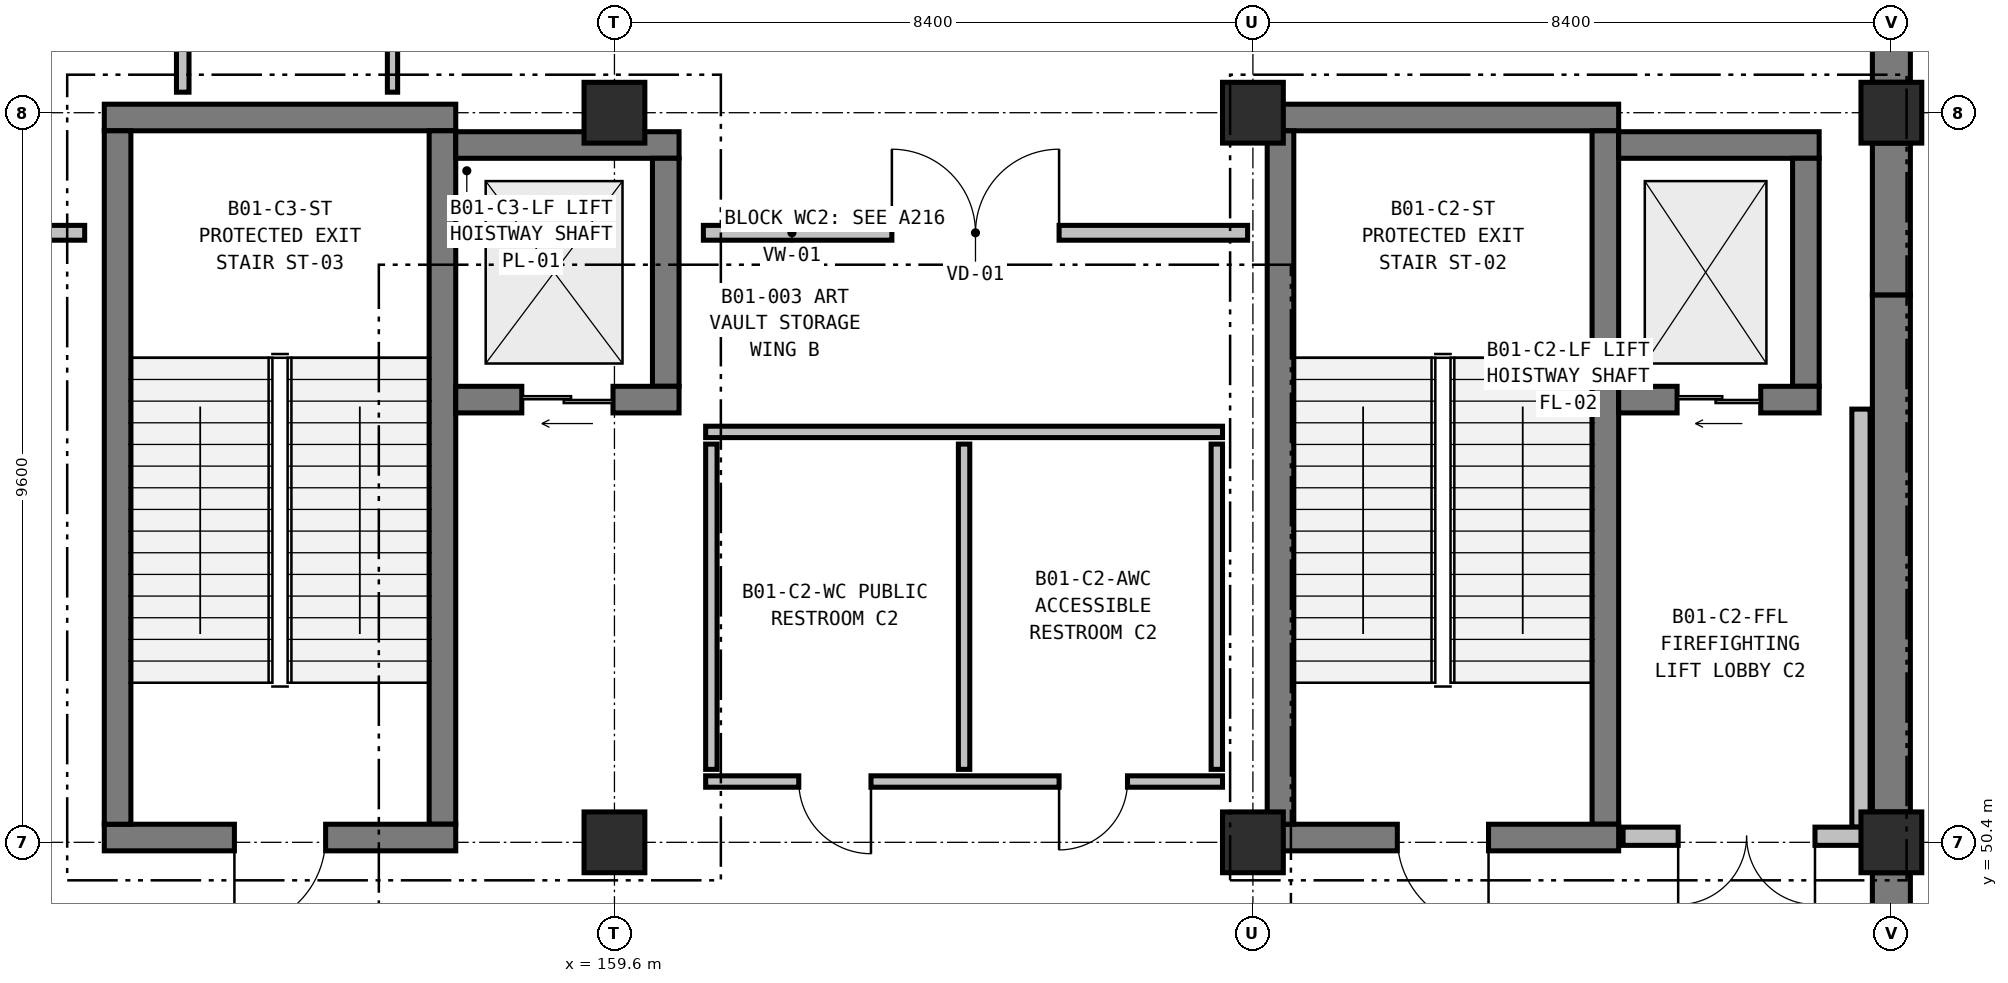
"""IFC4 building model, lengths in metres.
Left out: names, types, materials, properties, quantities, classifications, styles, units other than length and angle.
Written with IfcOpenShell. Run it as: python <this file> out.ifc"""

import sys

from ifc_helpers import new_model, si_unit, direction, frame, frame_2d, origin, origin_2d, place, context, subcontext, project, spatial, rectangle, extrude, element, fill, save


model = new_model("IFC4")
c1 = context("Model", 3, precision=1e-05, world=origin(), true_north=direction((0.0, 1.0)))
c2 = subcontext(c1, "Body", "Model", "MODEL_VIEW")
j1 = project(units=[si_unit("LENGTHUNIT", "METRE"), si_unit("PLANEANGLEUNIT", "RADIAN")], contexts=[c1])
p1 = place(None, origin())
s1 = spatial("IfcSite", under=j1, at=p1, CompositionType="ELEMENT")
p2 = place(p1, origin())
s2 = spatial("IfcBuilding", under=s1, at=p2, CompositionType="ELEMENT")
p3 = place(p2, frame((0.0, 0.0, -5.4)))
s3 = spatial("IfcBuildingStorey", under=s2, at=p3, CompositionType="ELEMENT", Elevation=-5.4)
for number, where, z_axis, x_axis in (
    (1, (159.6, 50.4, 0.0), (0.0, 0.0, 1.0), (1.0, 0.0, 0.0)),
    (2, (159.6, 60.0, 0.0), (0.0, 0.0, 1.0), (1.0, 0.0, 0.0)),
    (3, (168.0, 50.4, 0.0), (0.0, 0.0, 1.0), (1.0, 0.0, 0.0)),
    (4, (168.0, 60.0, 0.0), (0.0, 0.0, 1.0), (1.0, 0.0, 0.0)),
    (5, (176.4, 50.4, 0.0), (0.0, 0.0, 1.0), (1.0, 0.0, 0.0)),
    (6, (176.4, 60.0, 0.0), (0.0, 0.0, 1.0), (1.0, 0.0, 0.0)),
):
    element("IfcColumn", number, at=place(p3, frame(where, z_axis=z_axis, x_axis=x_axis)), inside=s3, PredefinedType="COLUMN", context=c2, shape_type="SweptSolid", body=[
        extrude(rectangle(XDim=0.8, YDim=0.8, at=origin_2d()), origin(), (0.0, 0.0, 1.0), 5.4),
    ])
p4 = place(p3, frame((176.4, 69.2, 0.0), z_axis=(0.0, 0.0, 1.0), x_axis=(0.0, -1.0, 0.0)))
e7 = element("IfcWall", 7, at=p4, inside=s3, PredefinedType="USERDEFINED", context=c2, shape_type="SweptSolid", body=[
    extrude(rectangle(XDim=8.8, YDim=0.5, at=frame_2d((4.4, 0.0))), origin(), (0.0, 0.0, 1.0), 5.06),
])
p5 = place(p3, frame((176.4, 59.6, 0.0), z_axis=(0.0, 0.0, 1.0), x_axis=(0.0, -1.0, 0.0)))
e8 = element("IfcWall", 8, at=p5, inside=s3, PredefinedType="USERDEFINED", context=c2, shape_type="SweptSolid", body=[
    extrude(rectangle(XDim=2.0, YDim=0.5, at=frame_2d((1.0, 0.0))), origin(), (0.0, 0.0, 1.0), 5.06),
])
p6 = place(p3, frame((176.4, 57.6, 0.0), z_axis=(0.0, 0.0, 1.0), x_axis=(0.0, -1.0, 0.0)))
e9 = element("IfcWall", 9, at=p6, inside=s3, PredefinedType="USERDEFINED", context=c2, shape_type="SweptSolid", body=[
    extrude(rectangle(XDim=6.8, YDim=0.5, at=frame_2d((3.4, 0.0))), origin(), (0.0, 0.0, 1.0), 5.06),
])
p7 = place(p3, frame((176.4, 50.0, 0.0), z_axis=(0.0, 0.0, 1.0), x_axis=(0.0, -1.0, 0.0)))
e10 = element("IfcWall", 10, at=p7, inside=s3, PredefinedType="USERDEFINED", context=c2, shape_type="SweptSolid", body=[
    extrude(rectangle(XDim=4.0, YDim=0.5, at=frame_2d((2.0, 0.0))), origin(), (0.0, 0.0, 1.0), 5.06),
])
p8 = place(p3, frame((168.188, 59.937, 0.0), z_axis=(0.0, 0.0, 1.0), x_axis=(1.0, 0.0, 0.0)))
e11 = element("IfcWall", 11, at=p8, inside=s3, PredefinedType="SHEAR", context=c2, shape_type="SweptSolid", body=[
    extrude(rectangle(XDim=4.624, YDim=0.35, at=frame_2d((2.312, 0.0))), origin(), (0.0, 0.0, 1.0), 5.06),
])
p9 = place(p3, frame((172.637, 59.762, 0.0), z_axis=(0.0, 0.0, 1.0), x_axis=(0.0, -1.0, 0.0)))
e12 = element("IfcWall", 12, at=p9, inside=s3, PredefinedType="SHEAR", context=c2, shape_type="SweptSolid", body=[
    extrude(rectangle(XDim=9.124, YDim=0.35, at=frame_2d((4.562, 0.0))), origin(), (0.0, 0.0, 1.0), 5.06),
])
p10 = place(p3, frame((172.812, 50.463, 0.0), z_axis=(0.0, 0.0, 1.0), x_axis=(-1.0, 0.0, 0.0)))
e13 = element("IfcWall", 13, at=p10, inside=s3, PredefinedType="SHEAR", context=c2, shape_type="SweptSolid", body=[
    extrude(rectangle(XDim=4.624, YDim=0.35, at=frame_2d((2.312, 0.0))), origin(), (0.0, 0.0, 1.0), 5.06),
])
p11 = place(p10, frame((1.712, 0.0, 0.0)))
e14 = element("IfcOpeningElement", 14, at=p11, cuts=e13, PredefinedType="OPENING", context=c2, shape_type="SweptSolid", body=[
    extrude(rectangle(XDim=1.2, YDim=2.2, at=frame_2d((0.6, 1.1))), frame((0.0, 0.185, 0.0), z_axis=(0.0, -1.0, 0.0), x_axis=(1.0, 0.0, 0.0)), (0.0, 0.0, 1.0), 0.37),
])
p12 = place(p3, frame((168.363, 50.638, 0.0), z_axis=(0.0, 0.0, 1.0), x_axis=(0.0, 1.0, 0.0)))
e15 = element("IfcWall", 15, at=p12, inside=s3, PredefinedType="SHEAR", context=c2, shape_type="SweptSolid", body=[
    extrude(rectangle(XDim=9.124, YDim=0.35, at=frame_2d((4.562, 0.0))), origin(), (0.0, 0.0, 1.0), 5.06),
])
p13 = place(p3, frame((172.812, 59.575, 0.0), z_axis=(0.0, 0.0, 1.0), x_axis=(1.0, 0.0, 0.0)))
e16 = element("IfcWall", 16, at=p13, inside=s3, PredefinedType="SHEAR", context=c2, shape_type="SweptSolid", body=[
    extrude(rectangle(XDim=2.638, YDim=0.35, at=frame_2d((1.319, 0.0))), origin(), (0.0, 0.0, 1.0), 5.06),
])
p14 = place(p3, frame((175.275, 59.4, 0.0), z_axis=(0.0, 0.0, 1.0), x_axis=(0.0, -1.0, 0.0)))
e17 = element("IfcWall", 17, at=p14, inside=s3, PredefinedType="SHEAR", context=c2, shape_type="SweptSolid", body=[
    extrude(rectangle(XDim=3.0, YDim=0.35, at=frame_2d((1.5, 0.0))), origin(), (0.0, 0.0, 1.0), 5.06),
])
p15 = place(p3, frame((175.45, 56.225, 0.0), z_axis=(0.0, 0.0, 1.0), x_axis=(-1.0, 0.0, 0.0)))
e18 = element("IfcWall", 18, at=p15, inside=s3, PredefinedType="SHEAR", context=c2, shape_type="SweptSolid", body=[
    extrude(rectangle(XDim=2.638, YDim=0.35, at=frame_2d((1.319, 0.0))), origin(), (0.0, 0.0, 1.0), 5.06),
])
p16 = place(p15, frame((0.769, 0.0, 0.0)))
e19 = element("IfcOpeningElement", 19, at=p16, cuts=e18, PredefinedType="OPENING", context=c2, shape_type="SweptSolid", body=[
    extrude(rectangle(XDim=1.1, YDim=2.2, at=frame_2d((0.55, 1.1))), frame((0.0, 0.185, 0.0), z_axis=(0.0, -1.0, 0.0), x_axis=(1.0, 0.0, 0.0)), (0.0, 0.0, 1.0), 0.37),
])
p17 = place(p3, frame((176.0, 56.1, 0.0), z_axis=(0.0, 0.0, 1.0), x_axis=(0.0, -1.0, 0.0)))
e20 = element("IfcWall", 20, at=p17, inside=s3, PredefinedType="PARTITIONING", context=c2, shape_type="SweptSolid", body=[
    extrude(rectangle(XDim=5.5, YDim=0.24, at=frame_2d((2.75, 0.0))), origin(), (0.0, 0.0, 1.0), 4.385),
])
p18 = place(p3, frame((176.12, 50.48, 0.0), z_axis=(0.0, 0.0, 1.0), x_axis=(-1.0, 0.0, 0.0)))
e21 = element("IfcWall", 21, at=p18, inside=s3, PredefinedType="PARTITIONING", context=c2, shape_type="SweptSolid", body=[
    extrude(rectangle(XDim=3.25, YDim=0.24, at=frame_2d((1.625, 0.0))), origin(), (0.0, 0.0, 1.0), 4.385),
])
p19 = place(p18, frame((0.725, 0.0, 0.0)))
e22 = element("IfcOpeningElement", 22, at=p19, cuts=e21, PredefinedType="OPENING", context=c2, shape_type="SweptSolid", body=[
    extrude(rectangle(XDim=1.8, YDim=2.25, at=frame_2d((0.9, 1.125))), frame((0.0, 0.13, 0.0), z_axis=(0.0, -1.0, 0.0), x_axis=(1.0, 0.0, 0.0)), (0.0, 0.0, 1.0), 0.26),
])
p20 = place(p3, frame((167.6, 51.2, 0.0), z_axis=(0.0, 0.0, 1.0), x_axis=(-1.0, 0.0, 0.0)))
e23 = element("IfcWall", 23, at=p20, inside=s3, PredefinedType="PARTITIONING", context=c2, shape_type="SweptSolid", body=[
    extrude(rectangle(XDim=6.8, YDim=0.15, at=frame_2d((3.4, 0.0))), origin(), (0.0, 0.0, 1.0), 5.06),
])
p21 = place(p20, frame((1.25, 0.0, 0.0)))
e24 = element("IfcOpeningElement", 24, at=p21, cuts=e23, PredefinedType="OPENING", context=c2, shape_type="SweptSolid", body=[
    extrude(rectangle(XDim=0.9, YDim=2.1, at=frame_2d((0.45, 1.05))), frame((0.0, 0.085, 0.0), z_axis=(0.0, -1.0, 0.0), x_axis=(1.0, 0.0, 0.0)), (0.0, 0.0, 1.0), 0.17),
])
p22 = place(p20, frame((4.625, 0.0, 0.0)))
e25 = element("IfcOpeningElement", 25, at=p22, cuts=e23, PredefinedType="OPENING", context=c2, shape_type="SweptSolid", body=[
    extrude(rectangle(XDim=0.95, YDim=2.15, at=frame_2d((0.475, 1.075))), frame((0.0, 0.085, 0.0), z_axis=(0.0, -1.0, 0.0), x_axis=(1.0, 0.0, 0.0)), (0.0, 0.0, 1.0), 0.17),
])
p23 = place(p3, frame((160.8, 55.8, 0.0), z_axis=(0.0, 0.0, 1.0), x_axis=(1.0, 0.0, 0.0)))
e26 = element("IfcWall", 26, at=p23, inside=s3, PredefinedType="PARTITIONING", context=c2, shape_type="SweptSolid", body=[
    extrude(rectangle(XDim=6.8, YDim=0.15, at=frame_2d((3.4, 0.0))), origin(), (0.0, 0.0, 1.0), 5.06),
])
for number, where, z_axis, x_axis in (
    (27, (160.875, 51.36, 0.0), (0.0, 0.0, 1.0), (0.0, 1.0, 0.0)),
    (28, (164.2, 51.36, 0.0), (0.0, 0.0, 1.0), (0.0, 1.0, 0.0)),
    (29, (167.525, 51.36, 0.0), (0.0, 0.0, 1.0), (0.0, 1.0, 0.0)),
):
    element("IfcWall", number, at=place(p3, frame(where, z_axis=z_axis, x_axis=x_axis)), inside=s3, PredefinedType="PARTITIONING", context=c2, shape_type="SweptSolid", body=[
        extrude(rectangle(XDim=4.28, YDim=0.15, at=frame_2d((2.14, 0.0))), origin(), (0.0, 0.0, 1.0), 5.06),
    ])
p24 = place(p3, frame((152.888, 59.937, 0.0), z_axis=(0.0, 0.0, 1.0), x_axis=(1.0, 0.0, 0.0)))
e30 = element("IfcWall", 30, at=p24, inside=s3, PredefinedType="SHEAR", context=c2, shape_type="SweptSolid", body=[
    extrude(rectangle(XDim=4.624, YDim=0.35, at=frame_2d((2.312, 0.0))), origin(), (0.0, 0.0, 1.0), 5.06),
])
p25 = place(p3, frame((157.337, 59.762, 0.0), z_axis=(0.0, 0.0, 1.0), x_axis=(0.0, -1.0, 0.0)))
e31 = element("IfcWall", 31, at=p25, inside=s3, PredefinedType="SHEAR", context=c2, shape_type="SweptSolid", body=[
    extrude(rectangle(XDim=9.124, YDim=0.35, at=frame_2d((4.562, 0.0))), origin(), (0.0, 0.0, 1.0), 5.06),
])
p26 = place(p3, frame((157.512, 50.463, 0.0), z_axis=(0.0, 0.0, 1.0), x_axis=(-1.0, 0.0, 0.0)))
e32 = element("IfcWall", 32, at=p26, inside=s3, PredefinedType="SHEAR", context=c2, shape_type="SweptSolid", body=[
    extrude(rectangle(XDim=4.624, YDim=0.35, at=frame_2d((2.312, 0.0))), origin(), (0.0, 0.0, 1.0), 5.06),
])
p27 = place(p26, frame((1.712, 0.0, 0.0)))
e33 = element("IfcOpeningElement", 33, at=p27, cuts=e32, PredefinedType="OPENING", context=c2, shape_type="SweptSolid", body=[
    extrude(rectangle(XDim=1.2, YDim=2.2, at=frame_2d((0.6, 1.1))), frame((0.0, 0.185, 0.0), z_axis=(0.0, -1.0, 0.0), x_axis=(1.0, 0.0, 0.0)), (0.0, 0.0, 1.0), 0.37),
])
p28 = place(p3, frame((153.063, 50.638, 0.0), z_axis=(0.0, 0.0, 1.0), x_axis=(0.0, 1.0, 0.0)))
e34 = element("IfcWall", 34, at=p28, inside=s3, PredefinedType="SHEAR", context=c2, shape_type="SweptSolid", body=[
    extrude(rectangle(XDim=9.124, YDim=0.35, at=frame_2d((4.562, 0.0))), origin(), (0.0, 0.0, 1.0), 5.06),
])
p29 = place(p3, frame((157.512, 59.575, 0.0), z_axis=(0.0, 0.0, 1.0), x_axis=(1.0, 0.0, 0.0)))
e35 = element("IfcWall", 35, at=p29, inside=s3, PredefinedType="SHEAR", context=c2, shape_type="SweptSolid", body=[
    extrude(rectangle(XDim=2.938, YDim=0.35, at=frame_2d((1.469, 0.0))), origin(), (0.0, 0.0, 1.0), 5.06),
])
p30 = place(p3, frame((160.275, 59.4, 0.0), z_axis=(0.0, 0.0, 1.0), x_axis=(0.0, -1.0, 0.0)))
e36 = element("IfcWall", 36, at=p30, inside=s3, PredefinedType="SHEAR", context=c2, shape_type="SweptSolid", body=[
    extrude(rectangle(XDim=3.0, YDim=0.35, at=frame_2d((1.5, 0.0))), origin(), (0.0, 0.0, 1.0), 5.06),
])
p31 = place(p3, frame((160.45, 56.225, 0.0), z_axis=(0.0, 0.0, 1.0), x_axis=(-1.0, 0.0, 0.0)))
e37 = element("IfcWall", 37, at=p31, inside=s3, PredefinedType="SHEAR", context=c2, shape_type="SweptSolid", body=[
    extrude(rectangle(XDim=2.938, YDim=0.35, at=frame_2d((1.469, 0.0))), origin(), (0.0, 0.0, 1.0), 5.06),
])
p32 = place(p31, frame((0.869, 0.0, 0.0)))
e38 = element("IfcOpeningElement", 38, at=p32, cuts=e37, PredefinedType="OPENING", context=c2, shape_type="SweptSolid", body=[
    extrude(rectangle(XDim=1.2, YDim=2.2, at=frame_2d((0.6, 1.1))), frame((0.0, 0.185, 0.0), z_axis=(0.0, -1.0, 0.0), x_axis=(1.0, 0.0, 0.0)), (0.0, 0.0, 1.0), 0.37),
])
p33 = place(p3, frame((134.8, 58.42, 0.0), z_axis=(0.0, 0.0, 1.0), x_axis=(1.0, 0.0, 0.0)))
e39 = element("IfcWall", 39, at=p33, inside=s3, PredefinedType="PARTITIONING", context=c2, shape_type="SweptSolid", body=[
    extrude(rectangle(XDim=17.83, YDim=0.195, at=frame_2d((8.915, 0.0))), origin(), (0.0, 0.0, 1.0), 4.235),
])
p34 = place(p33, frame((9.315, 0.0, 0.0)))
e40 = element("IfcOpeningElement", 40, at=p34, cuts=e39, PredefinedType="OPENING", context=c2, shape_type="SweptSolid", body=[
    extrude(rectangle(XDim=2.2, YDim=2.6, at=frame_2d((1.1, 1.3))), frame((0.0, 0.107, 0.0), z_axis=(0.0, -1.0, 0.0), x_axis=(1.0, 0.0, 0.0)), (0.0, 0.0, 1.0), 0.215),
])
p35 = place(p3, frame((160.77, 58.42, 0.0), z_axis=(0.0, 0.0, 1.0), x_axis=(1.0, 0.0, 0.0)))
e41 = element("IfcWall", 41, at=p35, inside=s3, PredefinedType="PARTITIONING", context=c2, shape_type="SweptSolid", body=[
    extrude(rectangle(XDim=7.16, YDim=0.195, at=frame_2d((3.58, 0.0))), origin(), (0.0, 0.0, 1.0), 4.235),
])
p36 = place(p35, frame((2.48, 0.0, 0.0)))
e42 = element("IfcOpeningElement", 42, at=p36, cuts=e41, PredefinedType="OPENING", context=c2, shape_type="SweptSolid", body=[
    extrude(rectangle(XDim=2.2, YDim=2.6, at=frame_2d((1.1, 1.3))), frame((0.0, 0.107, 0.0), z_axis=(0.0, -1.0, 0.0), x_axis=(1.0, 0.0, 0.0)), (0.0, 0.0, 1.0), 0.215),
])
p37 = place(p3, frame((153.92, 71.17, 0.0), z_axis=(0.0, 0.0, 1.0), x_axis=(0.0, -1.0, 0.0)))
e43 = element("IfcWall", 43, at=p37, inside=s3, PredefinedType="PARTITIONING", context=c2, shape_type="SweptSolid", body=[
    extrude(rectangle(XDim=10.9, YDim=0.165, at=frame_2d((5.45, 0.0))), origin(), (0.0, 0.0, 1.0), 4.185),
])
p38 = place(p37, frame((4.55, 0.0, 0.0)))
e44 = element("IfcOpeningElement", 44, at=p38, cuts=e43, PredefinedType="OPENING", context=c2, shape_type="SweptSolid", body=[
    extrude(rectangle(XDim=1.8, YDim=2.4, at=frame_2d((0.9, 1.2))), frame((0.0, 0.093, 0.0), z_axis=(0.0, -1.0, 0.0), x_axis=(1.0, 0.0, 0.0)), (0.0, 0.0, 1.0), 0.185),
])
p39 = place(p3, frame((156.68, 60.27, 0.0), z_axis=(0.0, 0.0, 1.0), x_axis=(0.0, 1.0, 0.0)))
e45 = element("IfcWall", 45, at=p39, inside=s3, PredefinedType="PARTITIONING", context=c2, shape_type="SweptSolid", body=[
    extrude(rectangle(XDim=10.9, YDim=0.135, at=frame_2d((5.45, 0.0))), origin(), (0.0, 0.0, 1.0), 4.185),
])
p40 = place(p39, frame((4.65, 0.0, 0.0)))
e46 = element("IfcOpeningElement", 46, at=p40, cuts=e45, PredefinedType="OPENING", context=c2, shape_type="SweptSolid", body=[
    extrude(rectangle(XDim=1.6, YDim=2.35, at=frame_2d((0.8, 1.175))), frame((0.0, 0.077, 0.0), z_axis=(0.0, -1.0, 0.0), x_axis=(1.0, 0.0, 0.0)), (0.0, 0.0, 1.0), 0.155),
])
p41 = place(p11, origin())
e47 = element("IfcDoor", 47, at=p41, inside=s3, OperationType="SINGLE_SWING_LEFT", PredefinedType="DOOR", context=c2, shape_type="SweptSolid", body=[
    extrude(rectangle(XDim=1.2, YDim=2.2, at=frame_2d((0.6, 1.1))), frame((0.0, 0.025, 0.0), z_axis=(0.0, -1.0, 0.0), x_axis=(1.0, 0.0, 0.0)), (0.0, 0.0, 1.0), 0.05),
])
fill(e14, e47)
p42 = place(p16, origin())
e48 = element("IfcDoor", 48, at=p42, inside=s3, OperationType="DOUBLE_DOOR_SLIDING", PredefinedType="DOOR", context=c2, shape_type="SweptSolid", body=[
    extrude(rectangle(XDim=1.1, YDim=2.2, at=frame_2d((0.55, 1.1))), frame((0.0, 0.025, 0.0), z_axis=(0.0, -1.0, 0.0), x_axis=(1.0, 0.0, 0.0)), (0.0, 0.0, 1.0), 0.05),
])
fill(e19, e48)
p43 = place(p19, origin())
e49 = element("IfcDoor", 49, at=p43, inside=s3, OperationType="DOUBLE_DOOR_SINGLE_SWING", PredefinedType="DOOR", context=c2, shape_type="SweptSolid", body=[
    extrude(rectangle(XDim=1.8, YDim=2.25, at=frame_2d((0.9, 1.125))), frame((0.0, 0.025, 0.0), z_axis=(0.0, -1.0, 0.0), x_axis=(1.0, 0.0, 0.0)), (0.0, 0.0, 1.0), 0.05),
])
fill(e22, e49)
p44 = place(p21, origin())
e50 = element("IfcDoor", 50, at=p44, inside=s3, OperationType="SINGLE_SWING_RIGHT", PredefinedType="DOOR", context=c2, shape_type="SweptSolid", body=[
    extrude(rectangle(XDim=0.9, YDim=2.1, at=frame_2d((0.45, 1.05))), frame((0.0, 0.025, 0.0), z_axis=(0.0, -1.0, 0.0), x_axis=(1.0, 0.0, 0.0)), (0.0, 0.0, 1.0), 0.05),
])
fill(e24, e50)
p45 = place(p22, origin())
e51 = element("IfcDoor", 51, at=p45, inside=s3, OperationType="SINGLE_SWING_LEFT", PredefinedType="DOOR", context=c2, shape_type="SweptSolid", body=[
    extrude(rectangle(XDim=0.95, YDim=2.15, at=frame_2d((0.475, 1.075))), frame((0.0, 0.025, 0.0), z_axis=(0.0, -1.0, 0.0), x_axis=(1.0, 0.0, 0.0)), (0.0, 0.0, 1.0), 0.05),
])
fill(e25, e51)
p46 = place(p27, origin())
e52 = element("IfcDoor", 52, at=p46, inside=s3, OperationType="SINGLE_SWING_RIGHT", PredefinedType="DOOR", context=c2, shape_type="SweptSolid", body=[
    extrude(rectangle(XDim=1.2, YDim=2.2, at=frame_2d((0.6, 1.1))), frame((0.0, 0.025, 0.0), z_axis=(0.0, -1.0, 0.0), x_axis=(1.0, 0.0, 0.0)), (0.0, 0.0, 1.0), 0.05),
])
fill(e33, e52)
p47 = place(p32, origin())
e53 = element("IfcDoor", 53, at=p47, inside=s3, OperationType="DOUBLE_DOOR_SLIDING", PredefinedType="DOOR", context=c2, shape_type="SweptSolid", body=[
    extrude(rectangle(XDim=1.2, YDim=2.2, at=frame_2d((0.6, 1.1))), frame((0.0, 0.025, 0.0), z_axis=(0.0, -1.0, 0.0), x_axis=(1.0, 0.0, 0.0)), (0.0, 0.0, 1.0), 0.05),
])
fill(e38, e53)
p48 = place(p36, origin())
e54 = element("IfcDoor", 54, at=p48, inside=s3, OperationType="DOUBLE_DOOR_SINGLE_SWING", PredefinedType="DOOR", context=c2, shape_type="SweptSolid", body=[
    extrude(rectangle(XDim=2.2, YDim=2.6, at=frame_2d((1.1, 1.3))), frame((0.0, 0.025, 0.0), z_axis=(0.0, -1.0, 0.0), x_axis=(1.0, 0.0, 0.0)), (0.0, 0.0, 1.0), 0.05),
])
fill(e42, e54)
save(model, sys.argv[1])
